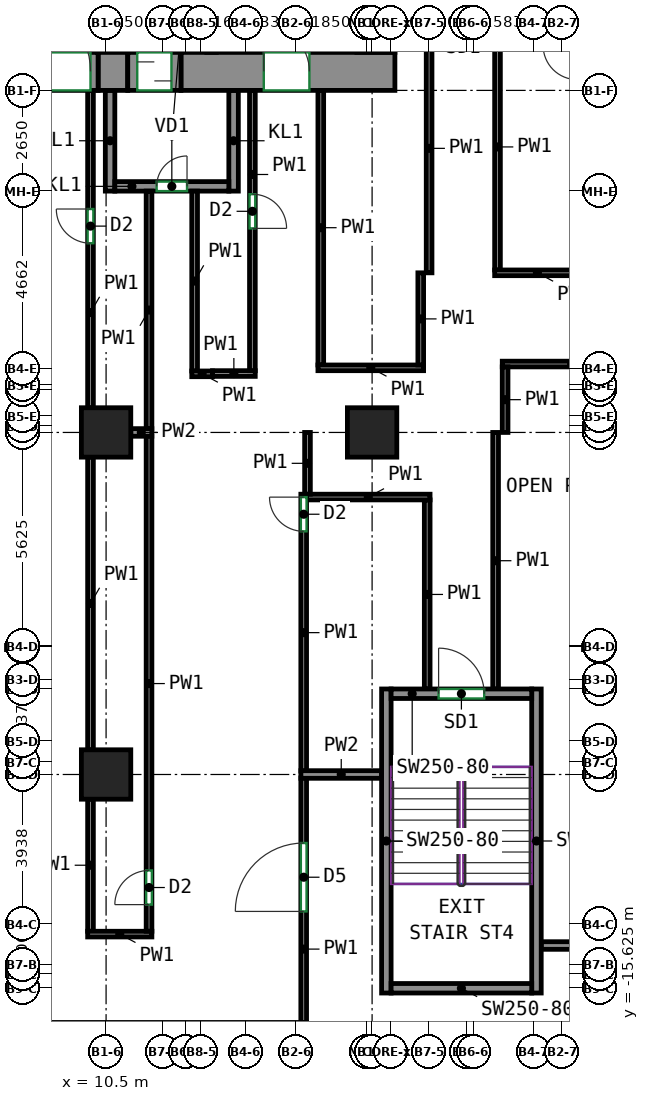
"""IFC4 building model, lengths in metres.
Left out: names, types, materials, properties, quantities, classifications, styles, units other than length and angle.
Written with IfcOpenShell. Run it as: python <this file> out.ifc"""

import sys

from ifc_helpers import new_model, si_unit, direction, frame, frame_2d, origin, origin_2d, place, context, subcontext, project, spatial, rectangle, extrude, source, transform, mapped, element, fill, save


model = new_model("IFC4")
c1 = context("Model", 3, precision=1e-05, world=origin(), true_north=direction((0.0, 1.0)))
c2 = subcontext(c1, "Body", "Model", "MODEL_VIEW")
j1 = project(units=[si_unit("LENGTHUNIT", "METRE"), si_unit("PLANEANGLEUNIT", "RADIAN")], contexts=[c1])
p1 = place(None, origin())
s1 = spatial("IfcSite", under=j1, at=p1, CompositionType="ELEMENT")
p2 = place(p1, origin())
s2 = spatial("IfcBuilding", under=s1, at=p2, CompositionType="ELEMENT")
p3 = place(p2, frame((0.0, 0.0, 39.0)))
s3 = spatial("IfcBuildingStorey", under=s2, at=p3, CompositionType="ELEMENT", Elevation=39.0)
m1 = source(origin(), c2, "Body", "SweptSolid", [
    extrude(rectangle(XDim=1.3, YDim=1.3, at=origin_2d()), origin(), (0.0, 0.0, 1.0), 3.72),
])
for number, where, z_axis, x_axis in (
    (1, (10.5, -10.0, 0.0), (0.0, 0.0, 1.0), (1.0, 0.0, 0.0)),
    (2, (10.5, -1.0, 0.0), (0.0, 0.0, 1.0), (1.0, 0.0, 0.0)),
    (3, (17.5, -1.0, 0.0), (0.0, 0.0, 1.0), (1.0, 0.0, 0.0)),
):
    element("IfcColumn", number, at=place(p3, frame(where, z_axis=z_axis, x_axis=x_axis)), inside=s3, PredefinedType="COLUMN", context=c2, shape_type="MappedRepresentation", body=[
        mapped(m1, transform((0.0, 0.0, 0.0))),
    ])
m2 = source(origin(), c2, "Body", "SweptSolid", [
    extrude(rectangle(XDim=0.78, YDim=1.0, at=frame_2d((0.39, 0.0))), origin(), (0.0, 0.0, 1.0), 3.72),
])
p4 = place(p3, frame((10.29, 8.5, 0.0), z_axis=(0.0, 0.0, 1.0), x_axis=(1.0, 0.0, 0.0)))
e4 = element("IfcWall", 4, at=p4, inside=s3, PredefinedType="SHEAR", context=c2, shape_type="MappedRepresentation", body=[
    mapped(m2, transform((0.0, 0.0, 0.0))),
])
m3 = source(origin(), c2, "Body", "SweptSolid", [
    extrude(rectangle(XDim=5.63, YDim=1.0, at=frame_2d((2.815, 0.0))), origin(), (0.0, 0.0, 1.0), 3.72),
])
p5 = place(p3, frame((12.47, 8.5, 0.0), z_axis=(0.0, 0.0, 1.0), x_axis=(1.0, 0.0, 0.0)))
e5 = element("IfcWall", 5, at=p5, inside=s3, PredefinedType="SHEAR", context=c2, shape_type="MappedRepresentation", body=[
    mapped(m3, transform((0.0, 0.0, 0.0))),
])
p6 = place(p5, frame((2.18, 0.0, 0.0)))
e6 = element("IfcOpeningElement", 6, at=p6, cuts=e5, PredefinedType="OPENING", context=c2, shape_type="SweptSolid", body=[
    extrude(rectangle(XDim=1.2, YDim=2.1, at=frame_2d((0.6, 1.05))), frame((0.0, 0.51, 0.0), z_axis=(0.0, -1.0, 0.0), x_axis=(1.0, 0.0, 0.0)), (0.0, 0.0, 1.0), 1.02),
])
m4 = source(origin(), c2, "Body", "SweptSolid", [
    extrude(rectangle(XDim=8.0, YDim=0.25, at=frame_2d((4.0, 0.0))), origin(), (0.0, 0.0, 1.0), 3.72),
])
for number, where, z_axis, x_axis in (
    (7, (17.875, -15.75, 0.0), (0.0, 0.0, 1.0), (0.0, 1.0, 0.0)),
    (8, (21.825, -15.75, 0.0), (0.0, 0.0, 1.0), (0.0, 1.0, 0.0)),
):
    element("IfcWall", number, at=place(p3, frame(where, z_axis=z_axis, x_axis=x_axis)), inside=s3, PredefinedType="SHEAR", context=c2, shape_type="MappedRepresentation", body=[
        mapped(m4, transform((0.0, 0.0, 0.0))),
    ])
m5 = source(origin(), c2, "Body", "SweptSolid", [
    extrude(rectangle(XDim=3.7, YDim=0.25, at=frame_2d((1.85, 0.0))), origin(), (0.0, 0.0, 1.0), 3.72),
])
p7 = place(p3, frame((18.0, -15.625, 0.0), z_axis=(0.0, 0.0, 1.0), x_axis=(1.0, 0.0, 0.0)))
e9 = element("IfcWall", 9, at=p7, inside=s3, PredefinedType="SHEAR", context=c2, shape_type="MappedRepresentation", body=[
    mapped(m5, transform((0.0, 0.0, 0.0))),
])
p8 = place(p3, frame((18.0, -7.875, 0.0), z_axis=(0.0, 0.0, 1.0), x_axis=(1.0, 0.0, 0.0)))
e10 = element("IfcWall", 10, at=p8, inside=s3, PredefinedType="SHEAR", context=c2, shape_type="MappedRepresentation", body=[
    mapped(m5, transform((0.0, 0.0, 0.0))),
])
p9 = place(p8, frame((1.25, 0.0, 0.0)))
e11 = element("IfcOpeningElement", 11, at=p9, cuts=e10, PredefinedType="OPENING", context=c2, shape_type="SweptSolid", body=[
    extrude(rectangle(XDim=1.2, YDim=2.1, at=frame_2d((0.6, 1.05))), frame((0.0, 0.135, 0.0), z_axis=(0.0, -1.0, 0.0), x_axis=(1.0, 0.0, 0.0)), (0.0, 0.0, 1.0), 0.27),
])
m6 = source(origin(), c2, "Body", "SweptSolid", [
    extrude(rectangle(XDim=2.65, YDim=0.25, at=frame_2d((1.325, 0.0))), origin(), (0.0, 0.0, 1.0), 3.72),
])
for number, where, z_axis, x_axis in (
    (12, (10.605, 5.35, 0.0), (0.0, 0.0, 1.0), (0.0, 1.0, 0.0)),
    (13, (13.855, 5.35, 0.0), (0.0, 0.0, 1.0), (0.0, 1.0, 0.0)),
):
    element("IfcWall", number, at=place(p3, frame(where, z_axis=z_axis, x_axis=x_axis)), inside=s3, PredefinedType="PARTITIONING", context=c2, shape_type="MappedRepresentation", body=[
        mapped(m6, transform((0.0, 0.0, 0.0))),
    ])
m7 = source(origin(), c2, "Body", "SweptSolid", [
    extrude(rectangle(XDim=3.0, YDim=0.25, at=frame_2d((1.5, 0.0))), origin(), (0.0, 0.0, 1.0), 3.72),
])
p10 = place(p3, frame((10.73, 5.475, 0.0), z_axis=(0.0, 0.0, 1.0), x_axis=(1.0, 0.0, 0.0)))
e14 = element("IfcWall", 14, at=p10, inside=s3, PredefinedType="PARTITIONING", context=c2, shape_type="MappedRepresentation", body=[
    mapped(m7, transform((0.0, 0.0, 0.0))),
])
p11 = place(p10, frame((1.1, 0.0, 0.0)))
e15 = element("IfcOpeningElement", 15, at=p11, cuts=e14, PredefinedType="OPENING", context=c2, shape_type="SweptSolid", body=[
    extrude(rectangle(XDim=0.8, YDim=2.0, at=frame_2d((0.4, 1.0))), frame((0.0, 0.135, 0.0), z_axis=(0.0, -1.0, 0.0), x_axis=(1.0, 0.0, 0.0)), (0.0, 0.0, 1.0), 0.27),
])
m8 = source(origin(), c2, "Body", "SweptSolid", [
    extrude(rectangle(XDim=2.4, YDim=1.0, at=frame_2d((1.2, 0.0))), origin(), (0.0, 0.0, 1.0), 2.7),
])
p12 = place(p3, frame((7.89, 8.5, 0.0), z_axis=(0.0, 0.0, 1.0), x_axis=(1.0, 0.0, 0.0)))
e16 = element("IfcWall", 16, at=p12, inside=s3, PredefinedType="PARTITIONING", context=c2, shape_type="MappedRepresentation", body=[
    mapped(m8, transform((0.0, 0.0, 0.0))),
])
p13 = place(p12, frame((0.2, 0.0, 0.0)))
e17 = element("IfcOpeningElement", 17, at=p13, cuts=e16, PredefinedType="OPENING", context=c2, shape_type="SweptSolid", body=[
    extrude(rectangle(XDim=2.0, YDim=2.1, at=frame_2d((1.0, 1.05))), frame((0.0, 0.51, 0.0), z_axis=(0.0, -1.0, 0.0), x_axis=(1.0, 0.0, 0.0)), (0.0, 0.0, 1.0), 1.02),
])
m9 = source(origin(), c2, "Body", "SweptSolid", [
    extrude(rectangle(XDim=1.4, YDim=1.0, at=frame_2d((0.7, 0.0))), origin(), (0.0, 0.0, 1.0), 2.7),
])
p14 = place(p3, frame((11.07, 8.5, 0.0), z_axis=(0.0, 0.0, 1.0), x_axis=(1.0, 0.0, 0.0)))
e18 = element("IfcWall", 18, at=p14, inside=s3, PredefinedType="PARTITIONING", context=c2, shape_type="MappedRepresentation", body=[
    mapped(m9, transform((0.0, 0.0, 0.0))),
])
p15 = place(p14, frame((0.25, 0.0, 0.0)))
e19 = element("IfcOpeningElement", 19, at=p15, cuts=e18, PredefinedType="OPENING", context=c2, shape_type="SweptSolid", body=[
    extrude(rectangle(XDim=0.9, YDim=2.1, at=frame_2d((0.45, 1.05))), frame((0.0, 0.51, 0.0), z_axis=(0.0, -1.0, 0.0), x_axis=(1.0, 0.0, 0.0)), (0.0, 0.0, 1.0), 1.02),
])
p16 = place(p3, frame((10.09, -9.35, 0.0), z_axis=(0.0, 0.0, 1.0), x_axis=(0.0, 1.0, 0.0)))
e20 = element("IfcWall", 20, at=p16, inside=s3, PredefinedType="PARTITIONING", context=c2, shape_type="SweptSolid", body=[
    extrude(rectangle(XDim=7.7, YDim=0.15, at=frame_2d((3.85, 0.0))), origin(), (0.0, 0.0, 1.0), 3.72),
])
p17 = place(p3, frame((10.09, -14.125, 0.0), z_axis=(0.0, 0.0, 1.0), x_axis=(0.0, 1.0, 0.0)))
e21 = element("IfcWall", 21, at=p17, inside=s3, PredefinedType="PARTITIONING", context=c2, shape_type="SweptSolid", body=[
    extrude(rectangle(XDim=3.475, YDim=0.15, at=frame_2d((1.738, 0.0))), origin(), (0.0, 0.0, 1.0), 3.72),
])
p18 = place(p3, frame((10.015, -14.2, 0.0), z_axis=(0.0, 0.0, 1.0), x_axis=(1.0, 0.0, 0.0)))
e22 = element("IfcWall", 22, at=p18, inside=s3, PredefinedType="PARTITIONING", context=c2, shape_type="SweptSolid", body=[
    extrude(rectangle(XDim=1.69, YDim=0.15, at=frame_2d((0.845, 0.0))), origin(), (0.0, 0.0, 1.0), 3.72),
])
p19 = place(p3, frame((11.63, -14.125, 0.0), z_axis=(0.0, 0.0, 1.0), x_axis=(0.0, 1.0, 0.0)))
e23 = element("IfcWall", 23, at=p19, inside=s3, PredefinedType="PARTITIONING", context=c2, shape_type="SweptSolid", body=[
    extrude(rectangle(XDim=13.035, YDim=0.15, at=frame_2d((6.518, 0.0))), origin(), (0.0, 0.0, 1.0), 3.72),
])
p20 = place(p19, frame((0.701, 0.0, 0.0)))
e24 = element("IfcOpeningElement", 24, at=p20, cuts=e23, PredefinedType="OPENING", context=c2, shape_type="SweptSolid", body=[
    extrude(rectangle(XDim=0.9, YDim=2.1, at=frame_2d((0.45, 1.05))), frame((0.0, 0.085, 0.0), z_axis=(0.0, -1.0, 0.0), x_axis=(1.0, 0.0, 0.0)), (0.0, 0.0, 1.0), 0.17),
])
p21 = place(p3, frame((10.09, -0.35, 0.0), z_axis=(0.0, 0.0, 1.0), x_axis=(0.0, 1.0, 0.0)))
e25 = element("IfcWall", 25, at=p21, inside=s3, PredefinedType="PARTITIONING", context=c2, shape_type="SweptSolid", body=[
    extrude(rectangle(XDim=8.35, YDim=0.15, at=frame_2d((4.175, 0.0))), origin(), (0.0, 0.0, 1.0), 3.72),
])
p22 = place(p21, frame((4.329, 0.0, 0.0)))
e26 = element("IfcOpeningElement", 26, at=p22, cuts=e25, PredefinedType="OPENING", context=c2, shape_type="SweptSolid", body=[
    extrude(rectangle(XDim=0.9, YDim=2.1, at=frame_2d((0.45, 1.05))), frame((0.0, 0.085, 0.0), z_axis=(0.0, -1.0, 0.0), x_axis=(1.0, 0.0, 0.0)), (0.0, 0.0, 1.0), 0.17),
])
p23 = place(p3, frame((11.63, -0.91, 0.0), z_axis=(0.0, 0.0, 1.0), x_axis=(0.0, 1.0, 0.0)))
e27 = element("IfcWall", 27, at=p23, inside=s3, PredefinedType="PARTITIONING", context=c2, shape_type="SweptSolid", body=[
    extrude(rectangle(XDim=6.26, YDim=0.15, at=frame_2d((3.13, 0.0))), origin(), (0.0, 0.0, 1.0), 3.72),
])
p24 = place(p3, frame((12.83, 0.617, 0.0), z_axis=(0.0, 0.0, 1.0), x_axis=(0.0, 1.0, 0.0)))
e28 = element("IfcWall", 28, at=p24, inside=s3, PredefinedType="PARTITIONING", context=c2, shape_type="SweptSolid", body=[
    extrude(rectangle(XDim=4.733, YDim=0.15, at=frame_2d((2.367, 0.0))), origin(), (0.0, 0.0, 1.0), 3.72),
])
p25 = place(p3, frame((13.3, 0.542, 0.0), z_axis=(0.0, 0.0, 1.0), x_axis=(-1.0, 0.0, 0.0)))
e29 = element("IfcWall", 29, at=p25, inside=s3, PredefinedType="PARTITIONING", context=c2, shape_type="SweptSolid", body=[
    extrude(rectangle(XDim=0.545, YDim=0.15, at=frame_2d((0.272, 0.0))), origin(), (0.0, 0.0, 1.0), 3.72),
])
p26 = place(p3, frame((13.3, 0.55, 0.0), z_axis=(0.0, 0.0, 1.0), x_axis=(1.0, 0.0, 0.0)))
e30 = element("IfcWall", 30, at=p26, inside=s3, PredefinedType="PARTITIONING", context=c2, shape_type="SweptSolid", body=[
    extrude(rectangle(XDim=1.125, YDim=0.15, at=frame_2d((0.562, 0.0))), origin(), (0.0, 0.0, 1.0), 3.72),
])
p27 = place(p3, frame((14.35, 8.0, 0.0), z_axis=(0.0, 0.0, 1.0), x_axis=(0.0, -1.0, 0.0)))
e31 = element("IfcWall", 31, at=p27, inside=s3, PredefinedType="PARTITIONING", context=c2, shape_type="SweptSolid", body=[
    extrude(rectangle(XDim=7.375, YDim=0.15, at=frame_2d((3.688, 0.0))), origin(), (0.0, 0.0, 1.0), 3.72),
])
p28 = place(p27, frame((2.731, 0.0, 0.0)))
e32 = element("IfcOpeningElement", 32, at=p28, cuts=e31, PredefinedType="OPENING", context=c2, shape_type="SweptSolid", body=[
    extrude(rectangle(XDim=0.9, YDim=2.1, at=frame_2d((0.45, 1.05))), frame((0.0, 0.085, 0.0), z_axis=(0.0, -1.0, 0.0), x_axis=(1.0, 0.0, 0.0)), (0.0, 0.0, 1.0), 0.17),
])
p29 = place(p3, frame((16.15, 0.775, 0.0), z_axis=(0.0, 0.0, 1.0), x_axis=(0.0, 1.0, 0.0)))
e33 = element("IfcWall", 33, at=p29, inside=s3, PredefinedType="PARTITIONING", context=c2, shape_type="SweptSolid", body=[
    extrude(rectangle(XDim=7.225, YDim=0.15, at=frame_2d((3.613, 0.0))), origin(), (0.0, 0.0, 1.0), 3.72),
])
p30 = place(p3, frame((16.075, 0.7, 0.0), z_axis=(0.0, 0.0, 1.0), x_axis=(1.0, 0.0, 0.0)))
e34 = element("IfcWall", 34, at=p30, inside=s3, PredefinedType="PARTITIONING", context=c2, shape_type="SweptSolid", body=[
    extrude(rectangle(XDim=2.78, YDim=0.15, at=frame_2d((1.39, 0.0))), origin(), (0.0, 0.0, 1.0), 3.72),
])
p31 = place(p3, frame((18.78, 3.2, 0.0), z_axis=(0.0, 0.0, 1.0), x_axis=(0.0, -1.0, 0.0)))
e35 = element("IfcWall", 35, at=p31, inside=s3, PredefinedType="PARTITIONING", context=c2, shape_type="SweptSolid", body=[
    extrude(rectangle(XDim=2.425, YDim=0.15, at=frame_2d((1.212, 0.0))), origin(), (0.0, 0.0, 1.0), 3.72),
])
p32 = place(p3, frame((19.0, 9.75, 0.0), z_axis=(0.0, 0.0, 1.0), x_axis=(0.0, -1.0, 0.0)))
e36 = element("IfcWall", 36, at=p32, inside=s3, PredefinedType="PARTITIONING", context=c2, shape_type="SweptSolid", body=[
    extrude(rectangle(XDim=6.55, YDim=0.15, at=frame_2d((3.275, 0.0))), origin(), (0.0, 0.0, 1.0), 3.72),
])
p33 = place(p3, frame((20.8, 3.275, 0.0), z_axis=(0.0, 0.0, 1.0), x_axis=(0.0, 1.0, 0.0)))
e37 = element("IfcWall", 37, at=p33, inside=s3, PredefinedType="PARTITIONING", context=c2, shape_type="SweptSolid", body=[
    extrude(rectangle(XDim=6.475, YDim=0.15, at=frame_2d((3.238, 0.0))), origin(), (0.0, 0.0, 1.0), 3.72),
])
p34 = place(p3, frame((20.725, 3.2, 0.0), z_axis=(0.0, 0.0, 1.0), x_axis=(1.0, 0.0, 0.0)))
e38 = element("IfcWall", 38, at=p34, inside=s3, PredefinedType="PARTITIONING", context=c2, shape_type="SweptSolid", body=[
    extrude(rectangle(XDim=2.25, YDim=0.15, at=frame_2d((1.125, 0.0))), origin(), (0.0, 0.0, 1.0), 3.72),
])
p35 = place(p3, frame((15.7, -16.525, 0.0), z_axis=(0.0, 0.0, 1.0), x_axis=(0.0, 1.0, 0.0)))
e39 = element("IfcWall", 39, at=p35, inside=s3, PredefinedType="PARTITIONING", context=c2, shape_type="SweptSolid", body=[
    extrude(rectangle(XDim=6.435, YDim=0.15, at=frame_2d((3.217, 0.0))), origin(), (0.0, 0.0, 1.0), 3.72),
])
p36 = place(p35, frame((2.922, 0.0, 0.0)))
e40 = element("IfcOpeningElement", 40, at=p36, cuts=e39, PredefinedType="OPENING", context=c2, shape_type="SweptSolid", body=[
    extrude(rectangle(XDim=1.8, YDim=2.1, at=frame_2d((0.9, 1.05))), frame((0.0, 0.085, 0.0), z_axis=(0.0, -1.0, 0.0), x_axis=(1.0, 0.0, 0.0)), (0.0, 0.0, 1.0), 0.17),
])
p37 = place(p3, frame((18.95, -2.775, 0.0), z_axis=(0.0, 0.0, 1.0), x_axis=(0.0, -1.0, 0.0)))
e41 = element("IfcWall", 41, at=p37, inside=s3, PredefinedType="PARTITIONING", context=c2, shape_type="SweptSolid", body=[
    extrude(rectangle(XDim=4.975, YDim=0.15, at=frame_2d((2.488, 0.0))), origin(), (0.0, 0.0, 1.0), 3.72),
])
p38 = place(p3, frame((15.775, -2.7, 0.0), z_axis=(0.0, 0.0, 1.0), x_axis=(1.0, 0.0, 0.0)))
e42 = element("IfcWall", 42, at=p38, inside=s3, PredefinedType="PARTITIONING", context=c2, shape_type="SweptSolid", body=[
    extrude(rectangle(XDim=3.25, YDim=0.15, at=frame_2d((1.625, 0.0))), origin(), (0.0, 0.0, 1.0), 3.72),
])
p39 = place(p3, frame((15.8, -2.625, 0.0), z_axis=(0.0, 0.0, 1.0), x_axis=(0.0, 1.0, 0.0)))
e43 = element("IfcWall", 43, at=p39, inside=s3, PredefinedType="PARTITIONING", context=c2, shape_type="SweptSolid", body=[
    extrude(rectangle(XDim=1.625, YDim=0.15, at=frame_2d((0.812, 0.0))), origin(), (0.0, 0.0, 1.0), 3.72),
])
p40 = place(p3, frame((15.7, -9.91, 0.0), z_axis=(0.0, 0.0, 1.0), x_axis=(0.0, 1.0, 0.0)))
e44 = element("IfcWall", 44, at=p40, inside=s3, PredefinedType="PARTITIONING", context=c2, shape_type="SweptSolid", body=[
    extrude(rectangle(XDim=7.285, YDim=0.15, at=frame_2d((3.643, 0.0))), origin(), (0.0, 0.0, 1.0), 3.72),
])
p41 = place(p40, frame((6.308, 0.0, 0.0)))
e45 = element("IfcOpeningElement", 45, at=p41, cuts=e44, PredefinedType="OPENING", context=c2, shape_type="SweptSolid", body=[
    extrude(rectangle(XDim=0.9, YDim=2.1, at=frame_2d((0.45, 1.05))), frame((0.0, 0.085, 0.0), z_axis=(0.0, -1.0, 0.0), x_axis=(1.0, 0.0, 0.0)), (0.0, 0.0, 1.0), 0.17),
])
p42 = place(p3, frame((20.925, 0.8, 0.0), z_axis=(0.0, 0.0, 1.0), x_axis=(1.0, 0.0, 0.0)))
e46 = element("IfcWall", 46, at=p42, inside=s3, PredefinedType="PARTITIONING", context=c2, shape_type="SweptSolid", body=[
    extrude(rectangle(XDim=3.65, YDim=0.15, at=frame_2d((1.825, 0.0))), origin(), (0.0, 0.0, 1.0), 3.72),
])
p43 = place(p3, frame((21.0, -1.0, 0.0), z_axis=(0.0, 0.0, 1.0), x_axis=(0.0, 1.0, 0.0)))
e47 = element("IfcWall", 47, at=p43, inside=s3, PredefinedType="PARTITIONING", context=c2, shape_type="SweptSolid", body=[
    extrude(rectangle(XDim=1.725, YDim=0.15, at=frame_2d((0.863, 0.0))), origin(), (0.0, 0.0, 1.0), 3.72),
])
p44 = place(p3, frame((20.75, -7.75, 0.0), z_axis=(0.0, 0.0, 1.0), x_axis=(0.0, 1.0, 0.0)))
e48 = element("IfcWall", 48, at=p44, inside=s3, PredefinedType="PARTITIONING", context=c2, shape_type="SweptSolid", body=[
    extrude(rectangle(XDim=6.75, YDim=0.15, at=frame_2d((3.375, 0.0))), origin(), (0.0, 0.0, 1.0), 3.72),
])
p45 = place(p3, frame((11.15, -1.0, 0.0), z_axis=(0.0, 0.0, 1.0), x_axis=(1.0, 0.0, 0.0)))
e49 = element("IfcWall", 49, at=p45, inside=s3, PredefinedType="PARTITIONING", context=c2, shape_type="SweptSolid", body=[
    extrude(rectangle(XDim=0.554, YDim=0.2, at=frame_2d((0.277, 0.0))), origin(), (0.0, 0.0, 1.0), 3.72),
])
p46 = place(p3, frame((17.75, -10.0, 0.0), z_axis=(0.0, 0.0, 1.0), x_axis=(-1.0, 0.0, 0.0)))
e50 = element("IfcWall", 50, at=p46, inside=s3, PredefinedType="PARTITIONING", context=c2, shape_type="SweptSolid", body=[
    extrude(rectangle(XDim=2.124, YDim=0.2, at=frame_2d((1.062, 0.0))), origin(), (0.0, 0.0, 1.0), 3.72),
])
p47 = place(p3, frame((24.6, -14.5, 0.0), z_axis=(0.0, 0.0, 1.0), x_axis=(-1.0, 0.0, 0.0)))
e51 = element("IfcWall", 51, at=p47, inside=s3, PredefinedType="PARTITIONING", context=c2, shape_type="SweptSolid", body=[
    extrude(rectangle(XDim=2.65, YDim=0.2, at=frame_2d((1.325, 0.0))), origin(), (0.0, 0.0, 1.0), 3.72),
])
p48 = place(p13, origin())
e52 = element("IfcDoor", 52, at=p48, inside=s3, OperationType="DOUBLE_DOOR_SINGLE_SWING", PredefinedType="DOOR", context=c2, shape_type="SweptSolid", body=[
    extrude(rectangle(XDim=2.0, YDim=2.1, at=frame_2d((1.0, 1.05))), frame((0.0, 0.405, 0.0), z_axis=(0.0, -1.0, 0.0), x_axis=(1.0, 0.0, 0.0)), (0.0, 0.0, 1.0), 0.05),
])
fill(e17, e52)
p49 = place(p11, origin())
e53 = element("IfcDoor", 53, at=p49, inside=s3, OperationType="SINGLE_SWING_RIGHT", PredefinedType="DOOR", context=c2, shape_type="SweptSolid", body=[
    extrude(rectangle(XDim=0.8, YDim=2.0, at=frame_2d((0.4, 1.0))), frame((0.0, 0.025, 0.0), z_axis=(0.0, -1.0, 0.0), x_axis=(1.0, 0.0, 0.0)), (0.0, 0.0, 1.0), 0.05),
])
fill(e15, e53)
p50 = place(p15, origin())
e54 = element("IfcDoor", 54, at=p50, inside=s3, OperationType="SLIDING_TO_LEFT", PredefinedType="DOOR", context=c2, shape_type="SweptSolid", body=[
    extrude(rectangle(XDim=0.9, YDim=2.1, at=frame_2d((0.45, 1.05))), frame((0.0, 0.405, 0.0), z_axis=(0.0, -1.0, 0.0), x_axis=(1.0, 0.0, 0.0)), (0.0, 0.0, 1.0), 0.05),
])
fill(e19, e54)
p51 = place(p6, origin())
e55 = element("IfcDoor", 55, at=p51, inside=s3, OperationType="DOUBLE_DOOR_SINGLE_SWING", PredefinedType="DOOR", context=c2, shape_type="SweptSolid", body=[
    extrude(rectangle(XDim=1.2, YDim=2.1, at=frame_2d((0.6, 1.05))), frame((0.0, 0.405, 0.0), z_axis=(0.0, -1.0, 0.0), x_axis=(1.0, 0.0, 0.0)), (0.0, 0.0, 1.0), 0.05),
])
fill(e6, e55)
p52 = place(p9, origin())
e56 = element("IfcDoor", 56, at=p52, inside=s3, OperationType="DOUBLE_DOOR_SINGLE_SWING", PredefinedType="DOOR", context=c2, shape_type="SweptSolid", body=[
    extrude(rectangle(XDim=1.2, YDim=2.1, at=frame_2d((0.6, 1.05))), frame((0.0, 0.025, 0.0), z_axis=(0.0, -1.0, 0.0), x_axis=(1.0, 0.0, 0.0)), (0.0, 0.0, 1.0), 0.05),
])
fill(e11, e56)
p53 = place(p20, origin())
e57 = element("IfcDoor", 57, at=p53, inside=s3, OperationType="SINGLE_SWING_LEFT", PredefinedType="DOOR", context=c2, shape_type="SweptSolid", body=[
    extrude(rectangle(XDim=0.9, YDim=2.1, at=frame_2d((0.45, 1.05))), frame((0.0, 0.025, 0.0), z_axis=(0.0, -1.0, 0.0), x_axis=(1.0, 0.0, 0.0)), (0.0, 0.0, 1.0), 0.05),
])
fill(e24, e57)
p54 = place(p36, origin())
e58 = element("IfcDoor", 58, at=p54, inside=s3, OperationType="DOUBLE_DOOR_SINGLE_SWING", PredefinedType="DOOR", context=c2, shape_type="SweptSolid", body=[
    extrude(rectangle(XDim=1.8, YDim=2.1, at=frame_2d((0.9, 1.05))), frame((0.0, 0.025, 0.0), z_axis=(0.0, -1.0, 0.0), x_axis=(1.0, 0.0, 0.0)), (0.0, 0.0, 1.0), 0.05),
])
fill(e40, e58)
p55 = place(p41, origin())
e59 = element("IfcDoor", 59, at=p55, inside=s3, OperationType="SINGLE_SWING_RIGHT", PredefinedType="DOOR", context=c2, shape_type="SweptSolid", body=[
    extrude(rectangle(XDim=0.9, YDim=2.1, at=frame_2d((0.45, 1.05))), frame((0.0, 0.025, 0.0), z_axis=(0.0, -1.0, 0.0), x_axis=(1.0, 0.0, 0.0)), (0.0, 0.0, 1.0), 0.05),
])
fill(e45, e59)
p56 = place(p22, origin())
e60 = element("IfcDoor", 60, at=p56, inside=s3, OperationType="SINGLE_SWING_RIGHT", PredefinedType="DOOR", context=c2, shape_type="SweptSolid", body=[
    extrude(rectangle(XDim=0.9, YDim=2.1, at=frame_2d((0.45, 1.05))), frame((0.0, 0.025, 0.0), z_axis=(0.0, -1.0, 0.0), x_axis=(1.0, 0.0, 0.0)), (0.0, 0.0, 1.0), 0.05),
])
fill(e26, e60)
p57 = place(p28, origin())
e61 = element("IfcDoor", 61, at=p57, inside=s3, OperationType="SINGLE_SWING_RIGHT", PredefinedType="DOOR", context=c2, shape_type="SweptSolid", body=[
    extrude(rectangle(XDim=0.9, YDim=2.1, at=frame_2d((0.45, 1.05))), frame((0.0, 0.025, 0.0), z_axis=(0.0, -1.0, 0.0), x_axis=(1.0, 0.0, 0.0)), (0.0, 0.0, 1.0), 0.05),
])
fill(e32, e61)
save(model, sys.argv[1])
